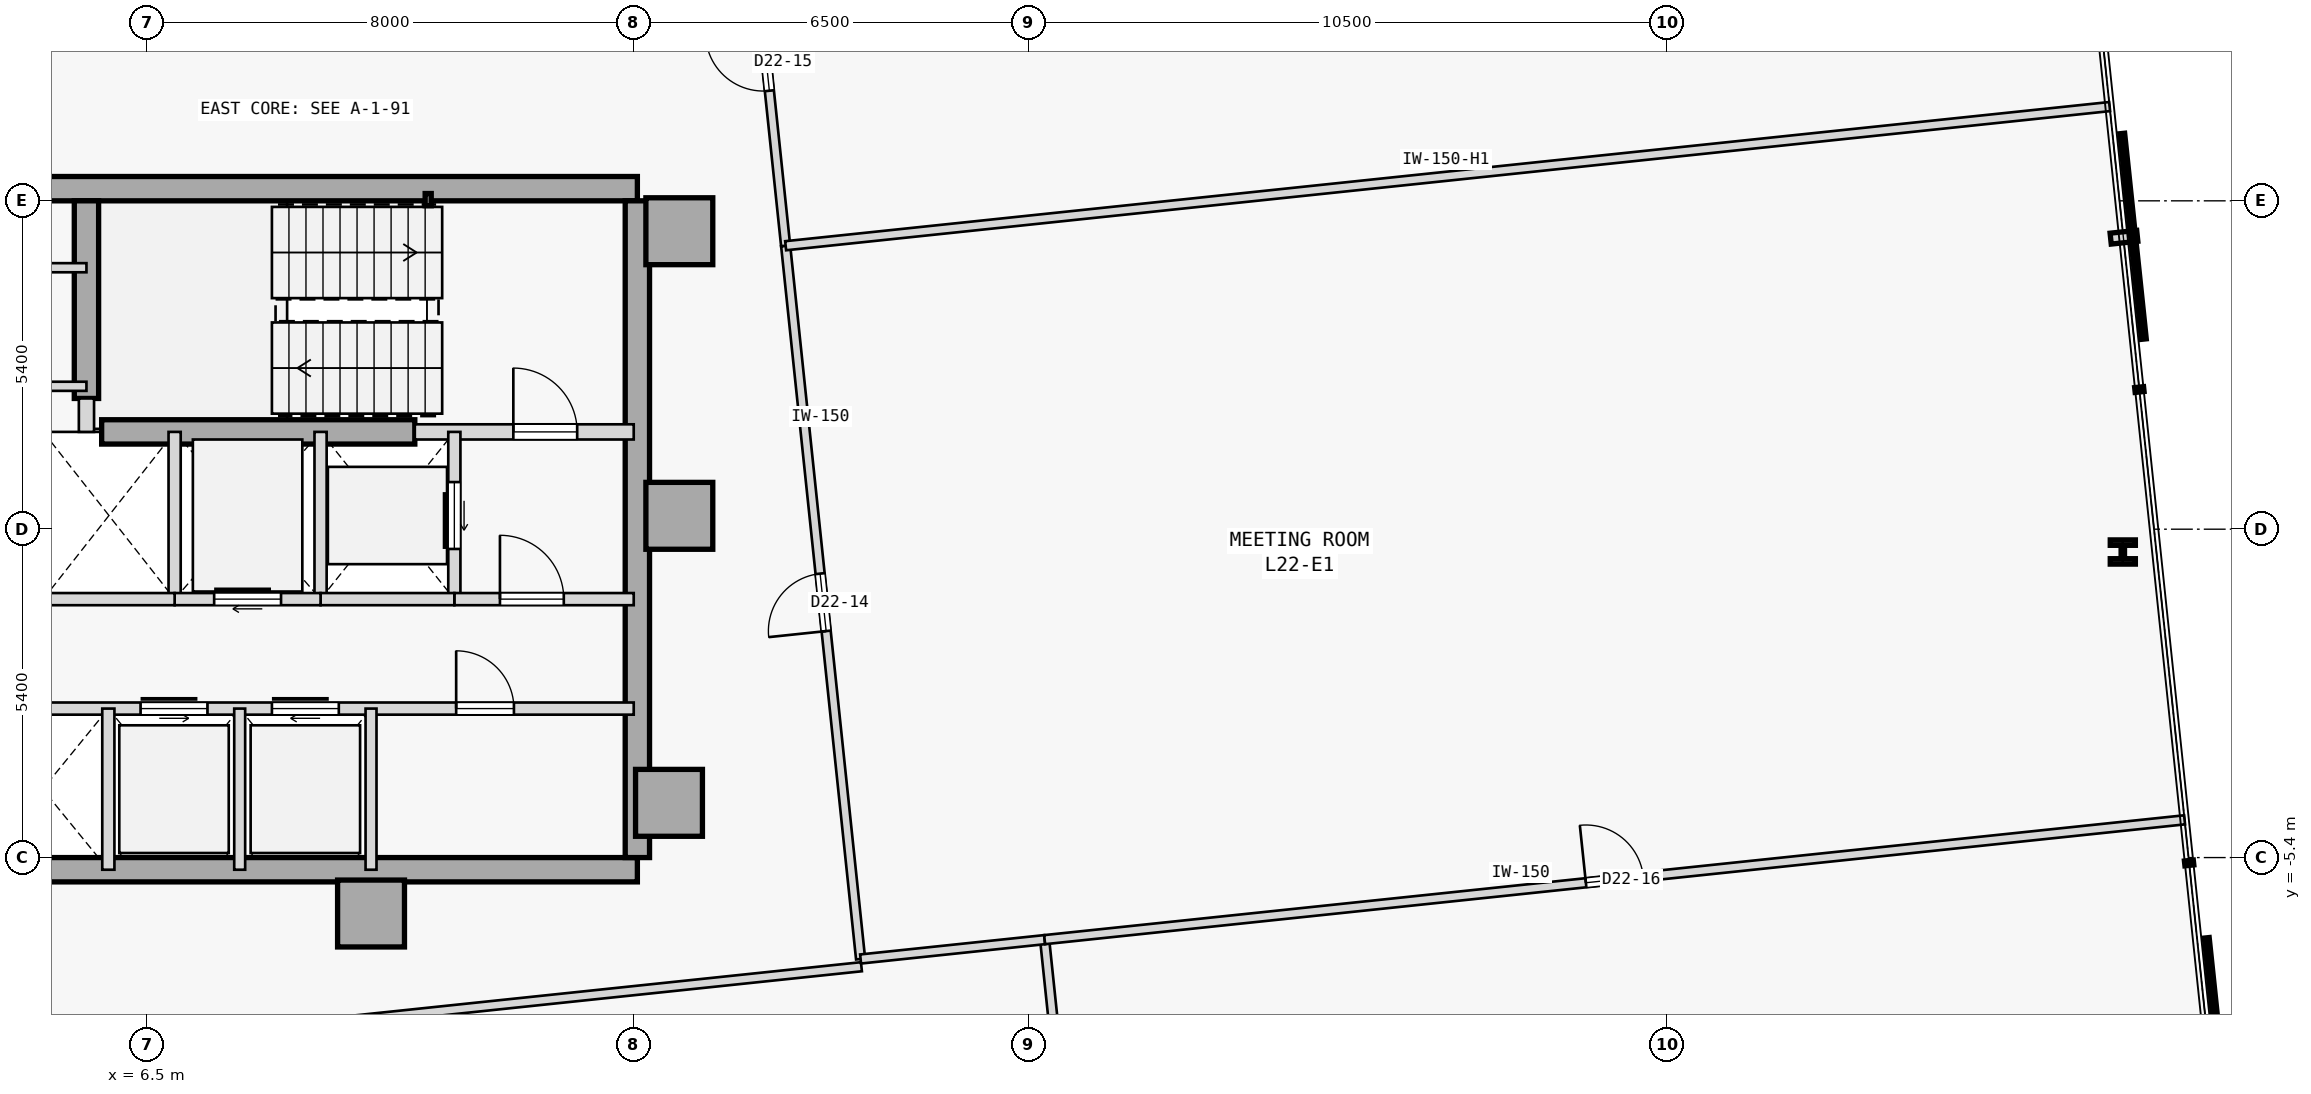
"""IFC4 building model, lengths in metres.
Left out: names, types, materials, properties, quantities, classifications, styles, units other than length and angle.
Written with IfcOpenShell. Run it as: python <this file> out.ifc"""

import sys

from ifc_helpers import new_model, si_unit, direction, frame, frame_2d, origin, origin_2d, place, context, subcontext, project, spatial, rectangle, hollow_rectangle, i_section, extrude, element, fill, save


model = new_model("IFC4")
c1 = context("Model", 3, precision=1e-05, world=origin(), true_north=direction((0.0, 1.0)))
c2 = subcontext(c1, "Body", "Model", "MODEL_VIEW")
j1 = project(units=[si_unit("LENGTHUNIT", "METRE"), si_unit("PLANEANGLEUNIT", "RADIAN")], contexts=[c1])
p1 = place(None, origin())
s1 = spatial("IfcSite", under=j1, at=p1, CompositionType="ELEMENT")
p2 = place(p1, origin())
s2 = spatial("IfcBuilding", under=s1, at=p2, CompositionType="ELEMENT")
p3 = place(p2, frame((0.0, 0.0, 91.1)))
s3 = spatial("IfcBuildingStorey", under=s2, at=p3, CompositionType="ELEMENT", Elevation=91.1)
for number, where, z_axis, x_axis in (
    (1, (15.25, 4.9, 0.0), (0.0, 0.0, 1.0), (1.0, 0.0, 0.0)),
    (2, (15.25, 0.22, 0.0), (0.0, 0.0, 1.0), (1.0, 0.0, 0.0)),
    (3, (15.08, -4.5, 0.0), (0.0, 0.0, 1.0), (1.0, 0.0, 0.0)),
    (4, (10.18, -6.32, 0.0), (0.0, 0.0, 1.0), (1.0, 0.0, 0.0)),
):
    element("IfcColumn", number, at=place(p3, frame(where, z_axis=z_axis, x_axis=x_axis)), inside=s3, PredefinedType="COLUMN", context=c2, shape_type="SweptSolid", body=[
        extrude(rectangle(XDim=1.1, YDim=1.1, at=origin_2d()), origin(), (0.0, 0.0, 1.0), 3.7),
    ])
p4 = place(p3, frame((3.15, 5.6, 0.0), z_axis=(0.0, 0.0, 1.0), x_axis=(1.0, 0.0, 0.0)))
e5 = element("IfcWall", 5, at=p4, inside=s3, PredefinedType="SHEAR", context=c2, shape_type="SweptSolid", body=[
    extrude(rectangle(XDim=11.41, YDim=0.4, at=frame_2d((5.705, 0.0))), origin(), (0.0, 0.0, 1.0), 3.475),
])
p5 = place(p3, frame((3.7, -5.6, 0.0), z_axis=(0.0, 0.0, 1.0), x_axis=(1.0, 0.0, 0.0)))
e6 = element("IfcWall", 6, at=p5, inside=s3, PredefinedType="SHEAR", context=c2, shape_type="SweptSolid", body=[
    extrude(rectangle(XDim=10.86, YDim=0.4, at=frame_2d((5.43, 0.0))), origin(), (0.0, 0.0, 1.0), 3.475),
])
p6 = place(p3, frame((14.56, -5.4, 0.0), z_axis=(0.0, 0.0, 1.0), x_axis=(0.0, 1.0, 0.0)))
e7 = element("IfcWall", 7, at=p6, inside=s3, PredefinedType="SHEAR", context=c2, shape_type="SweptSolid", body=[
    extrude(rectangle(XDim=10.8, YDim=0.4, at=frame_2d((5.4, 0.0))), origin(), (0.0, 0.0, 1.0), 3.475),
])
p7 = place(p3, frame((5.5, 2.15, 0.0), z_axis=(0.0, 0.0, 1.0), x_axis=(0.0, 1.0, 0.0)))
e8 = element("IfcWall", 8, at=p7, inside=s3, PredefinedType="SHEAR", context=c2, shape_type="SweptSolid", body=[
    extrude(rectangle(XDim=3.25, YDim=0.4, at=frame_2d((1.625, 0.0))), origin(), (0.0, 0.0, 1.0), 3.475),
])
p8 = place(p3, frame((5.75, 1.6, 0.0), z_axis=(0.0, 0.0, 1.0), x_axis=(1.0, 0.0, 0.0)))
e9 = element("IfcWall", 9, at=p8, inside=s3, PredefinedType="SHEAR", context=c2, shape_type="SweptSolid", body=[
    extrude(rectangle(XDim=5.15, YDim=0.4, at=frame_2d((2.575, 0.0))), origin(), (0.0, 0.0, 1.0), 3.475),
])
p9 = place(p3, frame((11.12, 5.42, 0.0), z_axis=(0.0, 0.0, 1.0), x_axis=(1.0, 0.0, 0.0)))
e10 = element("IfcColumn", 10, at=p9, inside=s3, PredefinedType="COLUMN", context=c2, shape_type="SweptSolid", body=[
    extrude(hollow_rectangle(XDim=0.1, YDim=0.2, WallThickness=0.008, at=origin_2d()), origin(), (0.0, 0.0, 1.0), 3.7),
])
p10 = place(p3, frame((38.988, -0.375, 0.0), z_axis=(0.0, 0.0, 1.0), x_axis=(1.0, 0.0, 0.0)))
e11 = element("IfcColumn", 11, at=p10, inside=s3, PredefinedType="COLUMN", context=c2, shape_type="SweptSolid", body=[
    extrude(i_section(OverallWidth=0.413, OverallDepth=0.398, WebThickness=0.056, FlangeThickness=0.089, FilletRadius=0.015, at=origin_2d()), origin(), (0.0, 0.0, 1.0), 3.7),
])
p11 = place(p3, frame((10.9, 1.6, 0.0), z_axis=(0.0, 0.0, 1.0), x_axis=(1.0, 0.0, 0.0)))
e12 = element("IfcWall", 12, at=p11, inside=s3, PredefinedType="STANDARD", context=c2, shape_type="SweptSolid", body=[
    extrude(rectangle(XDim=3.6, YDim=0.25, at=frame_2d((1.8, 0.0))), origin(), (0.0, 0.0, 1.0), 3.475),
])
p12 = place(p11, frame((1.62, 0.0, 0.0)))
e13 = element("IfcOpeningElement", 13, at=p12, cuts=e12, PredefinedType="OPENING", context=c2, shape_type="SweptSolid", body=[
    extrude(rectangle(XDim=1.05, YDim=2.15, at=frame_2d((0.525, 1.075))), frame((0.0, 0.135, 0.0), z_axis=(0.0, -1.0, 0.0), x_axis=(1.0, 0.0, 0.0)), (0.0, 0.0, 1.0), 0.27),
])
p13 = place(p3, frame((5.5, 1.6, 0.0), z_axis=(0.0, 0.0, 1.0), x_axis=(0.0, 1.0, 0.0)))
e14 = element("IfcWall", 14, at=p13, inside=s3, PredefinedType="STANDARD", context=c2, shape_type="SweptSolid", body=[
    extrude(rectangle(XDim=0.55, YDim=0.25, at=frame_2d((0.275, 0.0))), origin(), (0.0, 0.0, 1.0), 3.475),
])
p14 = place(p3, frame((11.55, -1.15, 0.0), z_axis=(0.0, 0.0, 1.0), x_axis=(0.0, 1.0, 0.0)))
e15 = element("IfcWall", 15, at=p14, inside=s3, PredefinedType="STANDARD", context=c2, shape_type="SweptSolid", body=[
    extrude(rectangle(XDim=2.75, YDim=0.2, at=frame_2d((1.375, 0.0))), origin(), (0.0, 0.0, 1.0), 3.475),
])
p15 = place(p14, frame((0.825, 0.0, 0.0)))
e16 = element("IfcOpeningElement", 16, at=p15, cuts=e15, PredefinedType="OPENING", context=c2, shape_type="SweptSolid", body=[
    extrude(rectangle(XDim=1.1, YDim=2.15, at=frame_2d((0.55, 1.075))), frame((0.0, 0.11, 0.0), z_axis=(0.0, -1.0, 0.0), x_axis=(1.0, 0.0, 0.0)), (0.0, 0.0, 1.0), 0.22),
])
p16 = place(p3, frame((9.35, -1.15, 0.0), z_axis=(0.0, 0.0, 1.0), x_axis=(0.0, 1.0, 0.0)))
e17 = element("IfcWall", 17, at=p16, inside=s3, PredefinedType="STANDARD", context=c2, shape_type="SweptSolid", body=[
    extrude(rectangle(XDim=2.75, YDim=0.2, at=frame_2d((1.375, 0.0))), origin(), (0.0, 0.0, 1.0), 3.475),
])
p17 = place(p3, frame((11.55, -1.15, 0.0), z_axis=(0.0, 0.0, 1.0), x_axis=(1.0, 0.0, 0.0)))
e18 = element("IfcWall", 18, at=p17, inside=s3, PredefinedType="STANDARD", context=c2, shape_type="SweptSolid", body=[
    extrude(rectangle(XDim=2.95, YDim=0.2, at=frame_2d((1.475, 0.0))), origin(), (0.0, 0.0, 1.0), 3.475),
])
p18 = place(p17, frame((0.75, 0.0, 0.0)))
e19 = element("IfcOpeningElement", 19, at=p18, cuts=e18, PredefinedType="OPENING", context=c2, shape_type="SweptSolid", body=[
    extrude(rectangle(XDim=1.05, YDim=2.18, at=frame_2d((0.525, 1.09))), frame((0.0, 0.11, 0.0), z_axis=(0.0, -1.0, 0.0), x_axis=(1.0, 0.0, 0.0)), (0.0, 0.0, 1.0), 0.22),
])
p19 = place(p3, frame((9.35, -1.15, 0.0), z_axis=(0.0, 0.0, 1.0), x_axis=(1.0, 0.0, 0.0)))
e20 = element("IfcWall", 20, at=p19, inside=s3, PredefinedType="STANDARD", context=c2, shape_type="SweptSolid", body=[
    extrude(rectangle(XDim=2.2, YDim=0.2, at=frame_2d((1.1, 0.0))), origin(), (0.0, 0.0, 1.0), 3.475),
])
p20 = place(p3, frame((6.95, -1.15, 0.0), z_axis=(0.0, 0.0, 1.0), x_axis=(0.0, 1.0, 0.0)))
e21 = element("IfcWall", 21, at=p20, inside=s3, PredefinedType="STANDARD", context=c2, shape_type="SweptSolid", body=[
    extrude(rectangle(XDim=2.75, YDim=0.2, at=frame_2d((1.375, 0.0))), origin(), (0.0, 0.0, 1.0), 3.475),
])
p21 = place(p3, frame((6.95, -1.15, 0.0), z_axis=(0.0, 0.0, 1.0), x_axis=(1.0, 0.0, 0.0)))
e22 = element("IfcWall", 22, at=p21, inside=s3, PredefinedType="STANDARD", context=c2, shape_type="SweptSolid", body=[
    extrude(rectangle(XDim=2.4, YDim=0.2, at=frame_2d((1.2, 0.0))), origin(), (0.0, 0.0, 1.0), 3.475),
])
p22 = place(p21, frame((0.65, 0.0, 0.0)))
e23 = element("IfcOpeningElement", 23, at=p22, cuts=e22, PredefinedType="OPENING", context=c2, shape_type="SweptSolid", body=[
    extrude(rectangle(XDim=1.1, YDim=2.15, at=frame_2d((0.55, 1.075))), frame((0.0, 0.11, 0.0), z_axis=(0.0, -1.0, 0.0), x_axis=(1.0, 0.0, 0.0)), (0.0, 0.0, 1.0), 0.22),
])
p23 = place(p3, frame((4.79, -1.15, 0.0), z_axis=(0.0, 0.0, 1.0), x_axis=(1.0, 0.0, 0.0)))
e24 = element("IfcWall", 24, at=p23, inside=s3, PredefinedType="STANDARD", context=c2, shape_type="SweptSolid", body=[
    extrude(rectangle(XDim=2.16, YDim=0.2, at=frame_2d((1.08, 0.0))), origin(), (0.0, 0.0, 1.0), 3.475),
])
p24 = place(p3, frame((3.7, -2.95, 0.0), z_axis=(0.0, 0.0, 1.0), x_axis=(1.0, 0.0, 0.0)))
e25 = element("IfcWall", 25, at=p24, inside=s3, PredefinedType="STANDARD", context=c2, shape_type="SweptSolid", body=[
    extrude(rectangle(XDim=10.8, YDim=0.2, at=frame_2d((5.4, 0.0))), origin(), (0.0, 0.0, 1.0), 3.475),
])
p25 = place(p24, frame((2.69, 0.0, 0.0)))
e26 = element("IfcOpeningElement", 26, at=p25, cuts=e25, PredefinedType="OPENING", context=c2, shape_type="SweptSolid", body=[
    extrude(rectangle(XDim=1.1, YDim=2.15, at=frame_2d((0.55, 1.075))), frame((0.0, 0.11, 0.0), z_axis=(0.0, -1.0, 0.0), x_axis=(1.0, 0.0, 0.0)), (0.0, 0.0, 1.0), 0.22),
])
p26 = place(p24, frame((4.85, 0.0, 0.0)))
e27 = element("IfcOpeningElement", 27, at=p26, cuts=e25, PredefinedType="OPENING", context=c2, shape_type="SweptSolid", body=[
    extrude(rectangle(XDim=1.1, YDim=2.15, at=frame_2d((0.55, 1.075))), frame((0.0, 0.11, 0.0), z_axis=(0.0, -1.0, 0.0), x_axis=(1.0, 0.0, 0.0)), (0.0, 0.0, 1.0), 0.22),
])
p27 = place(p24, frame((7.88, 0.0, 0.0)))
e28 = element("IfcOpeningElement", 28, at=p27, cuts=e25, PredefinedType="OPENING", context=c2, shape_type="SweptSolid", body=[
    extrude(rectangle(XDim=0.95, YDim=2.15, at=frame_2d((0.475, 1.075))), frame((0.0, 0.11, 0.0), z_axis=(0.0, -1.0, 0.0), x_axis=(1.0, 0.0, 0.0)), (0.0, 0.0, 1.0), 0.22),
])
p28 = place(p3, frame((5.86, -5.6, 0.0), z_axis=(0.0, 0.0, 1.0), x_axis=(0.0, 1.0, 0.0)))
e29 = element("IfcWall", 29, at=p28, inside=s3, PredefinedType="STANDARD", context=c2, shape_type="SweptSolid", body=[
    extrude(rectangle(XDim=2.65, YDim=0.2, at=frame_2d((1.325, 0.0))), origin(), (0.0, 0.0, 1.0), 3.475),
])
for number, where, z_axis, x_axis in (
    (30, (10.18, -5.6, 0.0), (0.0, 0.0, 1.0), (0.0, 1.0, 0.0)),
    (31, (8.02, -5.6, 0.0), (0.0, 0.0, 1.0), (0.0, 1.0, 0.0)),
):
    element("IfcWall", number, at=place(p3, frame(where, z_axis=z_axis, x_axis=x_axis)), inside=s3, PredefinedType="STANDARD", context=c2, shape_type="SweptSolid", body=[
        extrude(rectangle(XDim=2.65, YDim=0.18, at=frame_2d((1.325, 0.0))), origin(), (0.0, 0.0, 1.0), 3.475),
    ])
for number, where, z_axis, x_axis in (
    (32, (3.7, 4.3, 0.0), (0.0, 0.0, 1.0), (1.0, 0.0, 0.0)),
    (33, (3.7, 2.35, 0.0), (0.0, 0.0, 1.0), (1.0, 0.0, 0.0)),
):
    element("IfcWall", number, at=place(p3, frame(where, z_axis=z_axis, x_axis=x_axis)), inside=s3, PredefinedType="PARTITIONING", context=c2, shape_type="SweptSolid", body=[
        extrude(rectangle(XDim=1.8, YDim=0.15, at=frame_2d((0.9, 0.0))), origin(), (0.0, 0.0, 1.0), 3.475),
    ])
p29 = place(p3, frame((-12.336, 7.688, 0.0), z_axis=(0.0, 0.0, 1.0), x_axis=(0.994522386381, 0.104523791488, 0.0)))
e34 = element("IfcWall", 34, at=p29, inside=s3, PredefinedType="PARTITIONING", context=c2, shape_type="SweptSolid", body=[
    extrude(rectangle(XDim=27.55, YDim=0.15, at=frame_2d((13.775, 0.0))), origin(), (0.0, 0.0, 1.0), 3.475),
])
p30 = place(p29, frame((13.3, 0.0, 0.0)))
e35 = element("IfcOpeningElement", 35, at=p30, cuts=e34, PredefinedType="OPENING", context=c2, shape_type="SweptSolid", body=[
    extrude(rectangle(XDim=0.95, YDim=2.15, at=frame_2d((0.475, 1.075))), frame((0.0, 0.085, 0.0), z_axis=(0.0, -1.0, 0.0), x_axis=(1.0, 0.0, 0.0)), (0.0, 0.0, 1.0), 0.17),
])
p31 = place(p3, frame((-13.338, -10.515, 0.0), z_axis=(0.0, 0.0, 1.0), x_axis=(0.994522458216, 0.104523107989, 0.0)))
e36 = element("IfcWall", 36, at=p31, inside=s3, PredefinedType="PARTITIONING", context=c2, shape_type="SweptSolid", body=[
    extrude(rectangle(XDim=31.757, YDim=0.15, at=frame_2d((15.878, 0.0))), origin(), (0.0, 0.0, 1.0), 3.475),
])
p32 = place(p31, frame((15.404, 0.0, 0.0)))
e37 = element("IfcOpeningElement", 37, at=p32, cuts=e36, PredefinedType="OPENING", context=c2, shape_type="SweptSolid", body=[
    extrude(rectangle(XDim=0.95, YDim=2.15, at=frame_2d((0.475, 1.075))), frame((0.0, 0.085, 0.0), z_axis=(0.0, -1.0, 0.0), x_axis=(1.0, 0.0, 0.0)), (0.0, 0.0, 1.0), 0.17),
])
p33 = place(p3, frame((18.231, -7.068, 0.0), z_axis=(0.0, 0.0, 1.0), x_axis=(-0.104536082083, 0.994521094569, 0.0)))
e38 = element("IfcWall", 38, at=p33, inside=s3, PredefinedType="PARTITIONING", context=c2, shape_type="SweptSolid", body=[
    extrude(rectangle(XDim=11.794, YDim=0.15, at=frame_2d((5.897, 0.0))), origin(), (0.0, 0.0, 1.0), 3.475),
])
p34 = place(p33, frame((5.422, 0.0, 0.0)))
e39 = element("IfcOpeningElement", 39, at=p34, cuts=e38, PredefinedType="OPENING", context=c2, shape_type="SweptSolid", body=[
    extrude(rectangle(XDim=0.95, YDim=2.15, at=frame_2d((0.475, 1.075))), frame((0.0, 0.085, 0.0), z_axis=(0.0, -1.0, 0.0), x_axis=(1.0, 0.0, 0.0)), (0.0, 0.0, 1.0), 0.17),
])
p35 = place(p3, frame((16.998, 4.662, 0.0), z_axis=(0.0, 0.0, 1.0), x_axis=(-0.104515354875, 0.994523273029, 0.0)))
e40 = element("IfcWall", 40, at=p35, inside=s3, PredefinedType="PARTITIONING", context=c2, shape_type="SweptSolid", body=[
    extrude(rectangle(XDim=6.076, YDim=0.15, at=frame_2d((3.038, 0.0))), origin(), (0.0, 0.0, 1.0), 3.475),
])
p36 = place(p35, frame((2.563, 0.0, 0.0)))
e41 = element("IfcOpeningElement", 41, at=p36, cuts=e40, PredefinedType="OPENING", context=c2, shape_type="SweptSolid", body=[
    extrude(rectangle(XDim=0.95, YDim=2.15, at=frame_2d((0.475, 1.075))), frame((0.0, 0.085, 0.0), z_axis=(0.0, -1.0, 0.0), x_axis=(1.0, 0.0, 0.0)), (0.0, 0.0, 1.0), 0.17),
])
p37 = place(p3, frame((22.535, -18.904, 0.0), z_axis=(0.0, 0.0, 1.0), x_axis=(-0.104520477826, 0.99452273464, 0.0)))
e42 = element("IfcWall", 42, at=p37, inside=s3, PredefinedType="PARTITIONING", context=c2, shape_type="SweptSolid", body=[
    extrude(rectangle(XDim=12.221, YDim=0.15, at=frame_2d((6.11, 0.0))), origin(), (0.0, 0.0, 1.0), 3.475),
])
p38 = place(p3, frame((18.231, -7.068, 0.0), z_axis=(0.0, 0.0, 1.0), x_axis=(0.994520828596, 0.104538612428, 0.0)))
e43 = element("IfcWall", 43, at=p38, inside=s3, PredefinedType="PARTITIONING", context=c2, shape_type="SweptSolid", body=[
    extrude(rectangle(XDim=3.043, YDim=0.15, at=frame_2d((1.521, 0.0))), origin(), (0.0, 0.0, 1.0), 3.475),
])
p39 = place(p3, frame((21.258, -6.75, 0.0), z_axis=(0.0, 0.0, 1.0), x_axis=(0.994521409189, 0.104533088851, 0.0)))
e44 = element("IfcWall", 44, at=p39, inside=s3, PredefinedType="PARTITIONING", context=c2, shape_type="SweptSolid", body=[
    extrude(rectangle(XDim=18.85, YDim=0.15, at=frame_2d((9.425, 0.0))), origin(), (0.0, 0.0, 1.0), 3.475),
])
p40 = place(p39, frame((8.95, 0.0, 0.0)))
e45 = element("IfcOpeningElement", 45, at=p40, cuts=e44, PredefinedType="OPENING", context=c2, shape_type="SweptSolid", body=[
    extrude(rectangle(XDim=0.95, YDim=2.15, at=frame_2d((0.475, 1.075))), frame((0.0, 0.085, 0.0), z_axis=(0.0, -1.0, 0.0), x_axis=(1.0, 0.0, 0.0)), (0.0, 0.0, 1.0), 0.17),
])
p41 = place(p3, frame((16.998, 4.662, 0.0), z_axis=(0.0, 0.0, 1.0), x_axis=(0.994522487751, 0.10452282697, 0.0)))
e46 = element("IfcWall", 46, at=p41, inside=s3, PredefinedType="PARTITIONING", context=c2, shape_type="SweptSolid", body=[
    extrude(rectangle(XDim=21.893, YDim=0.15, at=frame_2d((10.947, 0.0))), origin(), (0.0, 0.0, 1.0), 3.025),
])
p42 = place(p12, origin())
e47 = element("IfcDoor", 47, at=p42, inside=s3, OperationType="SINGLE_SWING_LEFT", PredefinedType="DOOR", context=c2, shape_type="SweptSolid", body=[
    extrude(rectangle(XDim=1.05, YDim=2.15, at=frame_2d((0.525, 1.075))), frame((0.0, 0.025, 0.0), z_axis=(0.0, -1.0, 0.0), x_axis=(1.0, 0.0, 0.0)), (0.0, 0.0, 1.0), 0.05),
])
fill(e13, e47)
p43 = place(p18, origin())
e48 = element("IfcDoor", 48, at=p43, inside=s3, OperationType="SINGLE_SWING_LEFT", PredefinedType="DOOR", context=c2, shape_type="SweptSolid", body=[
    extrude(rectangle(XDim=1.05, YDim=2.18, at=frame_2d((0.525, 1.09))), frame((0.0, 0.025, 0.0), z_axis=(0.0, -1.0, 0.0), x_axis=(1.0, 0.0, 0.0)), (0.0, 0.0, 1.0), 0.05),
])
fill(e19, e48)
p44 = place(p15, origin())
e49 = element("IfcDoor", 49, at=p44, inside=s3, OperationType="SLIDING_TO_RIGHT", PredefinedType="DOOR", context=c2, shape_type="SweptSolid", body=[
    extrude(rectangle(XDim=1.1, YDim=2.15, at=frame_2d((0.55, 1.075))), frame((0.0, 0.025, 0.0), z_axis=(0.0, -1.0, 0.0), x_axis=(1.0, 0.0, 0.0)), (0.0, 0.0, 1.0), 0.05),
])
fill(e16, e49)
p45 = place(p22, origin())
e50 = element("IfcDoor", 50, at=p45, inside=s3, OperationType="SLIDING_TO_RIGHT", PredefinedType="DOOR", context=c2, shape_type="SweptSolid", body=[
    extrude(rectangle(XDim=1.1, YDim=2.15, at=frame_2d((0.55, 1.075))), frame((0.0, 0.025, 0.0), z_axis=(0.0, -1.0, 0.0), x_axis=(1.0, 0.0, 0.0)), (0.0, 0.0, 1.0), 0.05),
])
fill(e23, e50)
p46 = place(p25, origin())
e51 = element("IfcDoor", 51, at=p46, inside=s3, OperationType="SLIDING_TO_LEFT", PredefinedType="DOOR", context=c2, shape_type="SweptSolid", body=[
    extrude(rectangle(XDim=1.1, YDim=2.15, at=frame_2d((0.55, 1.075))), frame((0.0, 0.025, 0.0), z_axis=(0.0, -1.0, 0.0), x_axis=(1.0, 0.0, 0.0)), (0.0, 0.0, 1.0), 0.05),
])
fill(e26, e51)
p47 = place(p26, origin())
e52 = element("IfcDoor", 52, at=p47, inside=s3, OperationType="SLIDING_TO_RIGHT", PredefinedType="DOOR", context=c2, shape_type="SweptSolid", body=[
    extrude(rectangle(XDim=1.1, YDim=2.15, at=frame_2d((0.55, 1.075))), frame((0.0, 0.025, 0.0), z_axis=(0.0, -1.0, 0.0), x_axis=(1.0, 0.0, 0.0)), (0.0, 0.0, 1.0), 0.05),
])
fill(e27, e52)
p48 = place(p27, origin())
e53 = element("IfcDoor", 53, at=p48, inside=s3, OperationType="SINGLE_SWING_LEFT", PredefinedType="DOOR", context=c2, shape_type="SweptSolid", body=[
    extrude(rectangle(XDim=0.95, YDim=2.15, at=frame_2d((0.475, 1.075))), frame((0.0, 0.025, 0.0), z_axis=(0.0, -1.0, 0.0), x_axis=(1.0, 0.0, 0.0)), (0.0, 0.0, 1.0), 0.05),
])
fill(e28, e53)
p49 = place(p34, origin())
e54 = element("IfcDoor", 54, at=p49, inside=s3, OperationType="SINGLE_SWING_LEFT", PredefinedType="DOOR", context=c2, shape_type="SweptSolid", body=[
    extrude(rectangle(XDim=0.95, YDim=2.15, at=frame_2d((0.475, 1.075))), frame((0.0, 0.025, 0.0), z_axis=(0.0, -1.0, 0.0), x_axis=(1.0, 0.0, 0.0)), (0.0, 0.0, 1.0), 0.05),
])
fill(e39, e54)
p50 = place(p36, origin())
e55 = element("IfcDoor", 55, at=p50, inside=s3, OperationType="SINGLE_SWING_RIGHT", PredefinedType="DOOR", context=c2, shape_type="SweptSolid", body=[
    extrude(rectangle(XDim=0.95, YDim=2.15, at=frame_2d((0.475, 1.075))), frame((0.0, 0.025, 0.0), z_axis=(0.0, -1.0, 0.0), x_axis=(1.0, 0.0, 0.0)), (0.0, 0.0, 1.0), 0.05),
])
fill(e41, e55)
p51 = place(p40, origin())
e56 = element("IfcDoor", 56, at=p51, inside=s3, OperationType="SINGLE_SWING_LEFT", PredefinedType="DOOR", context=c2, shape_type="SweptSolid", body=[
    extrude(rectangle(XDim=0.95, YDim=2.15, at=frame_2d((0.475, 1.075))), frame((0.0, 0.025, 0.0), z_axis=(0.0, -1.0, 0.0), x_axis=(1.0, 0.0, 0.0)), (0.0, 0.0, 1.0), 0.05),
])
fill(e45, e56)
save(model, sys.argv[1])
